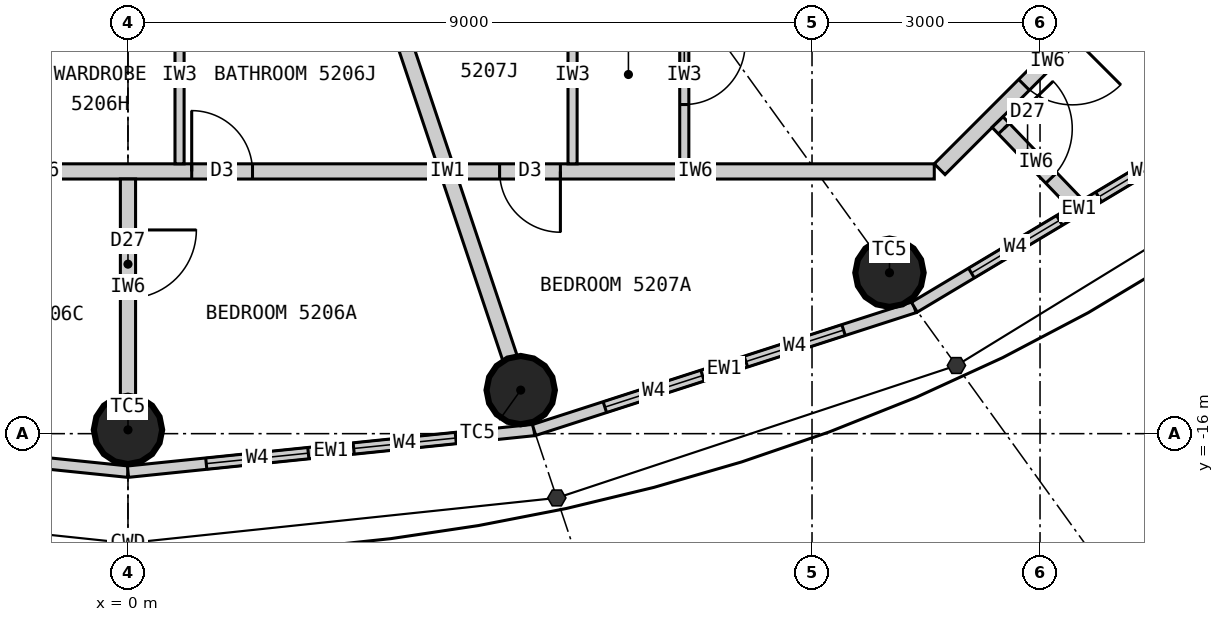
"""IFC4 building model, lengths in metres.
Left out: names, types, materials, properties, quantities, classifications, styles, units other than length and angle.
Written with IfcOpenShell. Run it as: python <this file> out.ifc"""

import sys

from ifc_helpers import new_model, si_unit, direction, frame, frame_2d, origin, origin_2d, place, context, subcontext, project, spatial, rectangle, circle, extrude, element, fill, save


model = new_model("IFC4")
c1 = context("Model", 3, precision=1e-05, world=origin(), true_north=direction((0.0, 1.0)))
c2 = subcontext(c1, "Body", "Model", "MODEL_VIEW")
j1 = project(units=[si_unit("LENGTHUNIT", "METRE"), si_unit("PLANEANGLEUNIT", "RADIAN")], contexts=[c1])
p1 = place(None, origin())
s1 = spatial("IfcSite", under=j1, at=p1, CompositionType="ELEMENT")
p2 = place(p1, origin())
s2 = spatial("IfcBuilding", under=s1, at=p2, CompositionType="ELEMENT")
p3 = place(p2, frame((0.0, 0.0, 196.2)))
s3 = spatial("IfcBuildingStorey", under=s2, at=p3, CompositionType="ELEMENT", Elevation=196.2)
for number, where, z_axis, x_axis in (
    (1, (0.0, -15.95, 0.0), (0.0, 0.0, 1.0), (1.0, 0.0, 0.0)),
    (2, (5.167, -15.427, 0.0), (0.0, 0.0, 1.0), (1.0, 0.0, 0.0)),
    (3, (10.019, -13.883, 0.0), (0.0, 0.0, 1.0), (1.0, 0.0, 0.0)),
):
    element("IfcColumn", number, at=place(p3, frame(where, z_axis=z_axis, x_axis=x_axis)), inside=s3, PredefinedType="COLUMN", context=c2, shape_type="SweptSolid", body=[
        extrude(circle(Radius=0.45, at=origin_2d()), origin(), (0.0, 0.0, 1.0), 3.3),
    ])
p4 = place(p3, frame((-5.343, -15.952, 0.0), z_axis=(0.0, 0.0, 1.0), x_axis=(0.994774574972, -0.102095763818, 0.0)))
e4 = element("IfcWall", 4, at=p4, inside=s3, PredefinedType="ELEMENTEDWALL", context=c2, shape_type="SweptSolid", body=[
    extrude(rectangle(XDim=5.371, YDim=0.15, at=frame_2d((2.686, 0.0))), origin(), (0.0, 0.0, 1.0), 3.12),
])
p5 = place(p4, frame((1.035, 0.0, 0.9)))
e5 = element("IfcOpeningElement", 5, at=p5, cuts=e4, PredefinedType="OPENING", context=c2, shape_type="SweptSolid", body=[
    extrude(rectangle(XDim=1.35, YDim=1.9, at=frame_2d((0.675, 0.95))), frame((0.0, 0.085, 0.0), z_axis=(0.0, -1.0, 0.0), x_axis=(1.0, 0.0, 0.0)), (0.0, 0.0, 1.0), 0.17),
])
p6 = place(p4, frame((2.985, 0.0, 0.9)))
e6 = element("IfcOpeningElement", 6, at=p6, cuts=e4, PredefinedType="OPENING", context=c2, shape_type="SweptSolid", body=[
    extrude(rectangle(XDim=1.35, YDim=1.9, at=frame_2d((0.675, 0.95))), frame((0.0, 0.085, 0.0), z_axis=(0.0, -1.0, 0.0), x_axis=(1.0, 0.0, 0.0)), (0.0, 0.0, 1.0), 0.17),
])
p7 = place(p3, frame((0.0, -16.5, 0.0), z_axis=(0.0, 0.0, 1.0), x_axis=(0.994774574972, 0.102095763818, 0.0)))
e7 = element("IfcWall", 7, at=p7, inside=s3, PredefinedType="ELEMENTEDWALL", context=c2, shape_type="SweptSolid", body=[
    extrude(rectangle(XDim=5.371, YDim=0.15, at=frame_2d((2.686, 0.0))), origin(), (0.0, 0.0, 1.0), 3.12),
])
p8 = place(p7, frame((1.035, 0.0, 0.9)))
e8 = element("IfcOpeningElement", 8, at=p8, cuts=e7, PredefinedType="OPENING", context=c2, shape_type="SweptSolid", body=[
    extrude(rectangle(XDim=1.35, YDim=1.9, at=frame_2d((0.675, 0.95))), frame((0.0, 0.085, 0.0), z_axis=(0.0, -1.0, 0.0), x_axis=(1.0, 0.0, 0.0)), (0.0, 0.0, 1.0), 0.17),
])
p9 = place(p7, frame((2.985, 0.0, 0.9)))
e9 = element("IfcOpeningElement", 9, at=p9, cuts=e7, PredefinedType="OPENING", context=c2, shape_type="SweptSolid", body=[
    extrude(rectangle(XDim=1.35, YDim=1.9, at=frame_2d((0.675, 0.95))), frame((0.0, 0.085, 0.0), z_axis=(0.0, -1.0, 0.0), x_axis=(1.0, 0.0, 0.0)), (0.0, 0.0, 1.0), 0.17),
])
p10 = place(p3, frame((5.343, -15.952, 0.0), z_axis=(0.0, 0.0, 1.0), x_axis=(0.951644702515, 0.307200846638, 0.0)))
e10 = element("IfcWall", 10, at=p10, inside=s3, PredefinedType="ELEMENTEDWALL", context=c2, shape_type="SweptSolid", body=[
    extrude(rectangle(XDim=5.258, YDim=0.15, at=frame_2d((2.629, 0.0))), origin(), (0.0, 0.0, 1.0), 3.12),
])
p11 = place(p10, frame((0.979, 0.0, 0.9)))
e11 = element("IfcOpeningElement", 11, at=p11, cuts=e10, PredefinedType="OPENING", context=c2, shape_type="SweptSolid", body=[
    extrude(rectangle(XDim=1.35, YDim=1.9, at=frame_2d((0.675, 0.95))), frame((0.0, 0.085, 0.0), z_axis=(0.0, -1.0, 0.0), x_axis=(1.0, 0.0, 0.0)), (0.0, 0.0, 1.0), 0.17),
])
p12 = place(p10, frame((2.929, 0.0, 0.9)))
e12 = element("IfcOpeningElement", 12, at=p12, cuts=e10, PredefinedType="OPENING", context=c2, shape_type="SweptSolid", body=[
    extrude(rectangle(XDim=1.35, YDim=1.9, at=frame_2d((0.675, 0.95))), frame((0.0, 0.085, 0.0), z_axis=(0.0, -1.0, 0.0), x_axis=(1.0, 0.0, 0.0)), (0.0, 0.0, 1.0), 0.17),
])
p13 = place(p3, frame((10.346, -14.336, 0.0), z_axis=(0.0, 0.0, 1.0), x_axis=(0.85822150553, 0.513279502265, 0.0)))
e13 = element("IfcWall", 13, at=p13, inside=s3, PredefinedType="ELEMENTEDWALL", context=c2, shape_type="SweptSolid", body=[
    extrude(rectangle(XDim=5.05, YDim=0.15, at=frame_2d((2.525, 0.0))), origin(), (0.0, 0.0, 1.0), 3.12),
])
p14 = place(p13, frame((0.875, 0.0, 0.9)))
e14 = element("IfcOpeningElement", 14, at=p14, cuts=e13, PredefinedType="OPENING", context=c2, shape_type="SweptSolid", body=[
    extrude(rectangle(XDim=1.35, YDim=1.9, at=frame_2d((0.675, 0.95))), frame((0.0, 0.085, 0.0), z_axis=(0.0, -1.0, 0.0), x_axis=(1.0, 0.0, 0.0)), (0.0, 0.0, 1.0), 0.17),
])
p15 = place(p13, frame((2.825, 0.0, 0.9)))
e15 = element("IfcOpeningElement", 15, at=p15, cuts=e13, PredefinedType="OPENING", context=c2, shape_type="SweptSolid", body=[
    extrude(rectangle(XDim=1.35, YDim=1.9, at=frame_2d((0.675, 0.95))), frame((0.0, 0.085, 0.0), z_axis=(0.0, -1.0, 0.0), x_axis=(1.0, 0.0, 0.0)), (0.0, 0.0, 1.0), 0.17),
])
p16 = place(p3, frame((3.383, -10.1, 0.0), z_axis=(0.0, 0.0, 1.0), x_axis=(0.317602151035, -0.948224063003, 0.0)))
e16 = element("IfcWall", 16, at=p16, inside=s3, PredefinedType="PARTITIONING", context=c2, shape_type="SweptSolid", body=[
    extrude(rectangle(XDim=5.168, YDim=0.2, at=frame_2d((2.584, 0.0))), origin(), (0.0, 0.0, 1.0), 2.42),
])
p17 = place(p3, frame((-6.364, -12.55, 0.0), z_axis=(0.0, 0.0, 1.0), x_axis=(1.0, 0.0, 0.0)))
e17 = element("IfcWall", 17, at=p17, inside=s3, PredefinedType="PARTITIONING", context=c2, shape_type="SweptSolid", body=[
    extrude(rectangle(XDim=10.446, YDim=0.2, at=frame_2d((5.223, 0.0))), origin(), (0.0, 0.0, 1.0), 3.12),
])
p18 = place(p17, frame((7.202, 0.0, 0.0)))
e18 = element("IfcOpeningElement", 18, at=p18, cuts=e17, PredefinedType="OPENING", context=c2, shape_type="SweptSolid", body=[
    extrude(rectangle(XDim=0.8, YDim=2.1, at=frame_2d((0.4, 1.05))), frame((0.0, 0.11, 0.0), z_axis=(0.0, -1.0, 0.0), x_axis=(1.0, 0.0, 0.0)), (0.0, 0.0, 1.0), 0.22),
])
p19 = place(p17, frame((3.895, 0.0, 0.0)))
e19 = element("IfcOpeningElement", 19, at=p19, cuts=e17, PredefinedType="OPENING", context=c2, shape_type="SweptSolid", body=[
    extrude(rectangle(XDim=0.9, YDim=2.1, at=frame_2d((0.45, 1.05))), frame((0.0, 0.11, 0.0), z_axis=(0.0, -1.0, 0.0), x_axis=(1.0, 0.0, 0.0)), (0.0, 0.0, 1.0), 0.22),
])
p20 = place(p3, frame((0.0, -12.65, 0.0), z_axis=(0.0, 0.0, 1.0), x_axis=(0.0, -1.0, 0.0)))
e20 = element("IfcWall", 20, at=p20, inside=s3, PredefinedType="PARTITIONING", context=c2, shape_type="SweptSolid", body=[
    extrude(rectangle(XDim=2.85, YDim=0.2, at=frame_2d((1.425, 0.0))), origin(), (0.0, 0.0, 1.0), 2.42),
])
p21 = place(p20, frame((0.67, 0.0, 0.0)))
e21 = element("IfcOpeningElement", 21, at=p21, cuts=e20, PredefinedType="OPENING", context=c2, shape_type="SweptSolid", body=[
    extrude(rectangle(XDim=0.9, YDim=2.1, at=frame_2d((0.45, 1.05))), frame((0.0, 0.11, 0.0), z_axis=(0.0, -1.0, 0.0), x_axis=(1.0, 0.0, 0.0)), (0.0, 0.0, 1.0), 0.22),
])
p22 = place(p3, frame((0.678, -10.1, 0.0), z_axis=(0.0, 0.0, 1.0), x_axis=(0.0, -1.0, 0.0)))
e22 = element("IfcWall", 22, at=p22, inside=s3, PredefinedType="PARTITIONING", context=c2, shape_type="SweptSolid", body=[
    extrude(rectangle(XDim=2.35, YDim=0.12, at=frame_2d((1.175, 0.0))), origin(), (0.0, 0.0, 1.0), 3.12),
])
p23 = place(p3, frame((4.325, -12.55, 0.0), z_axis=(0.0, 0.0, 1.0), x_axis=(1.0, 0.0, 0.0)))
e23 = element("IfcWall", 23, at=p23, inside=s3, PredefinedType="PARTITIONING", context=c2, shape_type="SweptSolid", body=[
    extrude(rectangle(XDim=6.284, YDim=0.2, at=frame_2d((3.142, 0.0))), origin(), (0.0, 0.0, 1.0), 3.12),
])
p24 = place(p23, frame((0.564, 0.0, 0.0)))
e24 = element("IfcOpeningElement", 24, at=p24, cuts=e23, PredefinedType="OPENING", context=c2, shape_type="SweptSolid", body=[
    extrude(rectangle(XDim=0.8, YDim=2.1, at=frame_2d((0.4, 1.05))), frame((0.0, 0.11, 0.0), z_axis=(0.0, -1.0, 0.0), x_axis=(1.0, 0.0, 0.0)), (0.0, 0.0, 1.0), 0.22),
])
p25 = place(p3, frame((10.679, -12.521, 0.0), z_axis=(0.0, 0.0, 1.0), x_axis=(0.707106781187, 0.707106781187, 0.0)))
e25 = element("IfcWall", 25, at=p25, inside=s3, PredefinedType="PARTITIONING", context=c2, shape_type="SweptSolid", body=[
    extrude(rectangle(XDim=4.019, YDim=0.2, at=frame_2d((2.009, 0.0))), origin(), (0.0, 0.0, 1.0), 3.12),
])
p26 = place(p25, frame((1.57, 0.0, 0.0)))
e26 = element("IfcOpeningElement", 26, at=p26, cuts=e25, PredefinedType="OPENING", context=c2, shape_type="SweptSolid", body=[
    extrude(rectangle(XDim=0.9, YDim=2.1, at=frame_2d((0.45, 1.05))), frame((0.0, 0.11, 0.0), z_axis=(0.0, -1.0, 0.0), x_axis=(1.0, 0.0, 0.0)), (0.0, 0.0, 1.0), 0.22),
])
p27 = place(p3, frame((11.441, -11.9, 0.0), z_axis=(0.0, 0.0, 1.0), x_axis=(0.692958717259, -0.720977264672, 0.0)))
e27 = element("IfcWall", 27, at=p27, inside=s3, PredefinedType="PARTITIONING", context=c2, shape_type="SweptSolid", body=[
    extrude(rectangle(XDim=1.464, YDim=0.2, at=frame_2d((0.732, 0.0))), origin(), (0.0, 0.0, 1.0), 3.12),
])
p28 = place(p27, frame((0.12, 0.0, 0.0)))
e28 = element("IfcOpeningElement", 28, at=p28, cuts=e27, PredefinedType="OPENING", context=c2, shape_type="SweptSolid", body=[
    extrude(rectangle(XDim=0.9, YDim=2.1, at=frame_2d((0.45, 1.05))), frame((0.0, 0.11, 0.0), z_axis=(0.0, -1.0, 0.0), x_axis=(1.0, 0.0, 0.0)), (0.0, 0.0, 1.0), 0.22),
])
p29 = place(p3, frame((5.849, -10.1, 0.0), z_axis=(0.0, 0.0, 1.0), x_axis=(0.0, -1.0, 0.0)))
e29 = element("IfcWall", 29, at=p29, inside=s3, PredefinedType="PARTITIONING", context=c2, shape_type="SweptSolid", body=[
    extrude(rectangle(XDim=2.35, YDim=0.12, at=frame_2d((1.175, 0.0))), origin(), (0.0, 0.0, 1.0), 3.12),
])
p30 = place(p3, frame((7.319, -10.1, 0.0), z_axis=(0.0, 0.0, 1.0), x_axis=(0.0, -1.0, 0.0)))
e30 = element("IfcWall", 30, at=p30, inside=s3, PredefinedType="PARTITIONING", context=c2, shape_type="SweptSolid", body=[
    extrude(rectangle(XDim=2.35, YDim=0.12, at=frame_2d((1.175, 0.0))), origin(), (0.0, 0.0, 1.0), 3.12),
])
p31 = place(p30, frame((0.77, 0.0, 0.0)))
e31 = element("IfcOpeningElement", 31, at=p31, cuts=e30, PredefinedType="OPENING", context=c2, shape_type="SweptSolid", body=[
    extrude(rectangle(XDim=0.8, YDim=2.1, at=frame_2d((0.4, 1.05))), frame((0.0, 0.07, 0.0), z_axis=(0.0, -1.0, 0.0), x_axis=(1.0, 0.0, 0.0)), (0.0, 0.0, 1.0), 0.14),
])
p32 = place(p8, origin())
e32 = element("IfcWindow", 32, at=p32, inside=s3, PartitioningType="SINGLE_PANEL", PredefinedType="WINDOW", context=c2, shape_type="SweptSolid", body=[
    extrude(rectangle(XDim=1.35, YDim=1.9, at=frame_2d((0.675, 0.95))), frame((0.0, 0.03, 0.0), z_axis=(0.0, -1.0, 0.0), x_axis=(1.0, 0.0, 0.0)), (0.0, 0.0, 1.0), 0.06),
])
fill(e8, e32)
p33 = place(p9, origin())
e33 = element("IfcWindow", 33, at=p33, inside=s3, PartitioningType="SINGLE_PANEL", PredefinedType="WINDOW", context=c2, shape_type="SweptSolid", body=[
    extrude(rectangle(XDim=1.35, YDim=1.9, at=frame_2d((0.675, 0.95))), frame((0.0, 0.03, 0.0), z_axis=(0.0, -1.0, 0.0), x_axis=(1.0, 0.0, 0.0)), (0.0, 0.0, 1.0), 0.06),
])
fill(e9, e33)
p34 = place(p11, origin())
e34 = element("IfcWindow", 34, at=p34, inside=s3, PartitioningType="SINGLE_PANEL", PredefinedType="WINDOW", context=c2, shape_type="SweptSolid", body=[
    extrude(rectangle(XDim=1.35, YDim=1.9, at=frame_2d((0.675, 0.95))), frame((0.0, 0.03, 0.0), z_axis=(0.0, -1.0, 0.0), x_axis=(1.0, 0.0, 0.0)), (0.0, 0.0, 1.0), 0.06),
])
fill(e11, e34)
p35 = place(p12, origin())
e35 = element("IfcWindow", 35, at=p35, inside=s3, PartitioningType="SINGLE_PANEL", PredefinedType="WINDOW", context=c2, shape_type="SweptSolid", body=[
    extrude(rectangle(XDim=1.35, YDim=1.9, at=frame_2d((0.675, 0.95))), frame((0.0, 0.03, 0.0), z_axis=(0.0, -1.0, 0.0), x_axis=(1.0, 0.0, 0.0)), (0.0, 0.0, 1.0), 0.06),
])
fill(e12, e35)
p36 = place(p14, origin())
e36 = element("IfcWindow", 36, at=p36, inside=s3, PartitioningType="SINGLE_PANEL", PredefinedType="WINDOW", context=c2, shape_type="SweptSolid", body=[
    extrude(rectangle(XDim=1.35, YDim=1.9, at=frame_2d((0.675, 0.95))), frame((0.0, 0.03, 0.0), z_axis=(0.0, -1.0, 0.0), x_axis=(1.0, 0.0, 0.0)), (0.0, 0.0, 1.0), 0.06),
])
fill(e14, e36)
p37 = place(p15, origin())
e37 = element("IfcWindow", 37, at=p37, inside=s3, PartitioningType="SINGLE_PANEL", PredefinedType="WINDOW", context=c2, shape_type="SweptSolid", body=[
    extrude(rectangle(XDim=1.35, YDim=1.9, at=frame_2d((0.675, 0.95))), frame((0.0, 0.03, 0.0), z_axis=(0.0, -1.0, 0.0), x_axis=(1.0, 0.0, 0.0)), (0.0, 0.0, 1.0), 0.06),
])
fill(e15, e37)
p38 = place(p18, origin())
e38 = element("IfcDoor", 38, at=p38, inside=s3, OperationType="SINGLE_SWING_LEFT", PredefinedType="DOOR", context=c2, shape_type="SweptSolid", body=[
    extrude(rectangle(XDim=0.8, YDim=2.1, at=frame_2d((0.4, 1.05))), frame((0.0, 0.025, 0.0), z_axis=(0.0, -1.0, 0.0), x_axis=(1.0, 0.0, 0.0)), (0.0, 0.0, 1.0), 0.05),
])
fill(e18, e38)
p39 = place(p21, origin())
e39 = element("IfcDoor", 39, at=p39, inside=s3, OperationType="SINGLE_SWING_LEFT", PredefinedType="DOOR", context=c2, shape_type="SweptSolid", body=[
    extrude(rectangle(XDim=0.9, YDim=2.1, at=frame_2d((0.45, 1.05))), frame((0.0, 0.025, 0.0), z_axis=(0.0, -1.0, 0.0), x_axis=(1.0, 0.0, 0.0)), (0.0, 0.0, 1.0), 0.05),
])
fill(e21, e39)
p40 = place(p24, origin())
e40 = element("IfcDoor", 40, at=p40, inside=s3, OperationType="SINGLE_SWING_RIGHT", PredefinedType="DOOR", context=c2, shape_type="SweptSolid", body=[
    extrude(rectangle(XDim=0.8, YDim=2.1, at=frame_2d((0.4, 1.05))), frame((0.0, 0.025, 0.0), z_axis=(0.0, -1.0, 0.0), x_axis=(1.0, 0.0, 0.0)), (0.0, 0.0, 1.0), 0.05),
])
fill(e24, e40)
p41 = place(p31, origin())
e41 = element("IfcDoor", 41, at=p41, inside=s3, OperationType="SINGLE_SWING_LEFT", PredefinedType="DOOR", context=c2, shape_type="SweptSolid", body=[
    extrude(rectangle(XDim=0.8, YDim=2.1, at=frame_2d((0.4, 1.05))), frame((0.0, 0.025, 0.0), z_axis=(0.0, -1.0, 0.0), x_axis=(1.0, 0.0, 0.0)), (0.0, 0.0, 1.0), 0.05),
])
fill(e31, e41)
p42 = place(p26, origin())
e42 = element("IfcDoor", 42, at=p42, inside=s3, OperationType="SINGLE_SWING_RIGHT", PredefinedType="DOOR", context=c2, shape_type="SweptSolid", body=[
    extrude(rectangle(XDim=0.9, YDim=2.1, at=frame_2d((0.45, 1.05))), frame((0.0, 0.025, 0.0), z_axis=(0.0, -1.0, 0.0), x_axis=(1.0, 0.0, 0.0)), (0.0, 0.0, 1.0), 0.05),
])
fill(e26, e42)
p43 = place(p28, origin())
e43 = element("IfcDoor", 43, at=p43, inside=s3, OperationType="SINGLE_SWING_LEFT", PredefinedType="DOOR", context=c2, shape_type="SweptSolid", body=[
    extrude(rectangle(XDim=0.9, YDim=2.1, at=frame_2d((0.45, 1.05))), frame((0.0, 0.025, 0.0), z_axis=(0.0, -1.0, 0.0), x_axis=(1.0, 0.0, 0.0)), (0.0, 0.0, 1.0), 0.05),
])
fill(e28, e43)
save(model, sys.argv[1])
